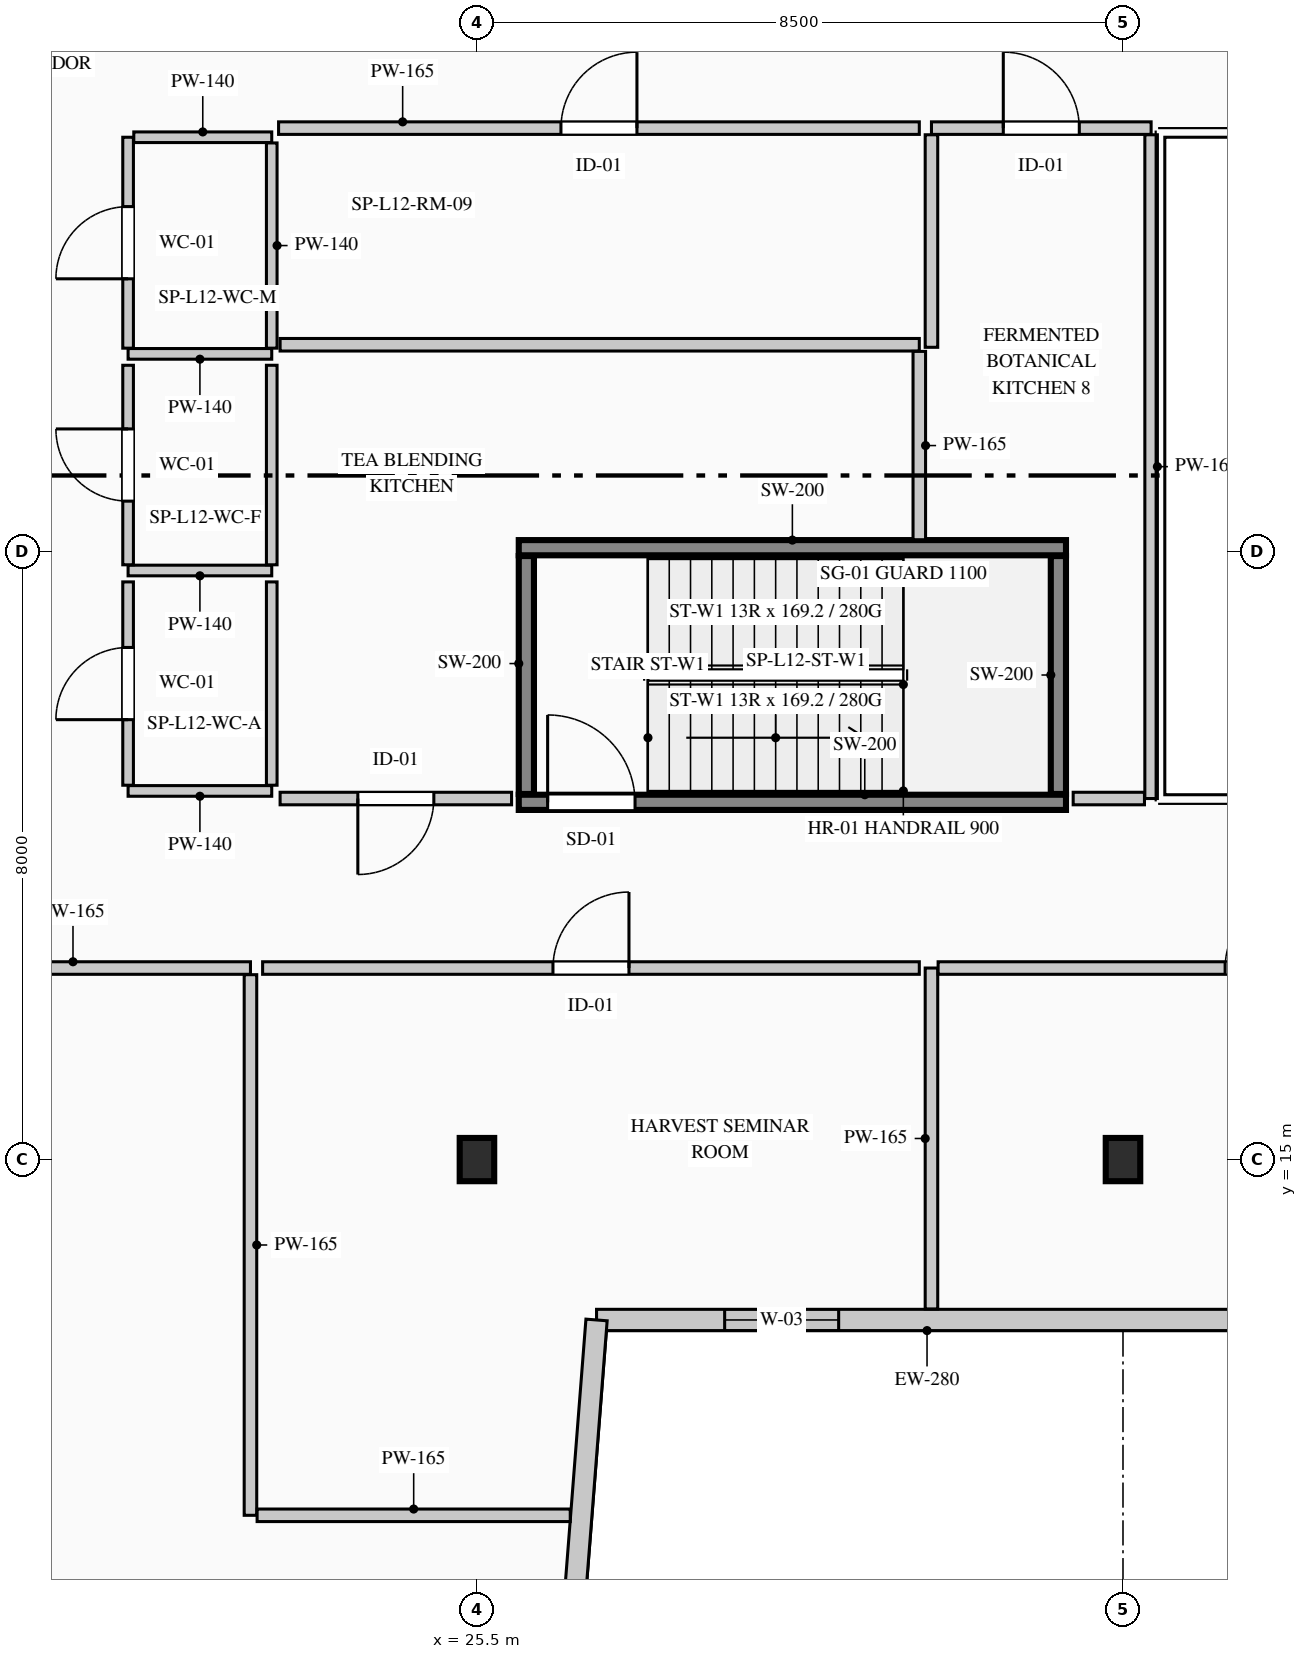
"""IFC4 building model, lengths in metres.
Left out: names, types, materials, properties, quantities, classifications, styles, units other than length and angle.
Written with IfcOpenShell. Run it as: python <this file> out.ifc"""

import sys

from ifc_helpers import new_model, si_unit, direction, frame, frame_2d, origin, origin_2d, place, context, subcontext, project, spatial, rectangle, i_section, extrude, element, fill, save


model = new_model("IFC4")
c1 = context("Model", 3, precision=1e-05, world=origin(), true_north=direction((0.0, 1.0)))
c2 = subcontext(c1, "Body", "Model", "MODEL_VIEW")
j1 = project(units=[si_unit("LENGTHUNIT", "METRE"), si_unit("PLANEANGLEUNIT", "RADIAN")], contexts=[c1])
p1 = place(None, origin())
s1 = spatial("IfcSite", under=j1, at=p1, CompositionType="ELEMENT")
p2 = place(p1, origin())
s2 = spatial("IfcBuilding", under=s1, at=p2, CompositionType="ELEMENT")
p3 = place(p2, frame((0.0, 0.0, 53.4)))
s3 = spatial("IfcBuildingStorey", under=s2, at=p3, CompositionType="ELEMENT", Elevation=53.4)
p4 = place(p3, frame((26.05, 19.7, 0.0), z_axis=(0.0, 0.0, 1.0), x_axis=(1.0, 0.0, 0.0)))
e1 = element("IfcWall", 1, at=p4, inside=s3, PredefinedType="SHEAR", context=c2, shape_type="SweptSolid", body=[
    extrude(rectangle(XDim=7.2, YDim=0.2, at=frame_2d((3.6, 0.0))), origin(), (0.0, 0.0, 1.0), 4.4),
])
p5 = place(p4, frame((0.38, 0.0, 0.0)))
e2 = element("IfcOpeningElement", 2, at=p5, cuts=e1, PredefinedType="OPENING", context=c2, shape_type="SweptSolid", body=[
    extrude(rectangle(XDim=1.15, YDim=2.2, at=frame_2d((0.575, 1.1))), frame((0.0, 0.11, 0.0), z_axis=(0.0, -1.0, 0.0), x_axis=(1.0, 0.0, 0.0)), (0.0, 0.0, 1.0), 0.22),
])
p6 = place(p3, frame((26.05, 23.05, 0.0), z_axis=(0.0, 0.0, 1.0), x_axis=(1.0, 0.0, 0.0)))
e3 = element("IfcWall", 3, at=p6, inside=s3, PredefinedType="SHEAR", context=c2, shape_type="SweptSolid", body=[
    extrude(rectangle(XDim=7.2, YDim=0.2, at=frame_2d((3.6, 0.0))), origin(), (0.0, 0.0, 1.0), 4.4),
])
for number, where, z_axis, x_axis in (
    (4, (26.15, 19.81, 0.0), (0.0, 0.0, 1.0), (0.0, 1.0, 0.0)),
    (5, (33.15, 19.81, 0.0), (0.0, 0.0, 1.0), (0.0, 1.0, 0.0)),
):
    element("IfcWall", number, at=place(p3, frame(where, z_axis=z_axis, x_axis=x_axis)), inside=s3, PredefinedType="SHEAR", context=c2, shape_type="SweptSolid", body=[
        extrude(rectangle(XDim=3.13, YDim=0.2, at=frame_2d((1.565, 0.0))), origin(), (0.0, 0.0, 1.0), 4.4),
    ])
for number, where, z_axis, x_axis in (
    (6, (25.5, 15.0, 0.0), (0.0, 0.0, 1.0), (1.0, 0.0, 0.0)),
    (7, (34.0, 15.0, 0.0), (0.0, 0.0, 1.0), (1.0, 0.0, 0.0)),
):
    element("IfcColumn", number, at=place(p3, frame(where, z_axis=z_axis, x_axis=x_axis)), inside=s3, PredefinedType="COLUMN", context=c2, shape_type="SweptSolid", body=[
        extrude(i_section(OverallWidth=0.454, OverallDepth=0.569, WebThickness=0.078, FlangeThickness=0.08, FilletRadius=0.015, at=origin_2d()), origin(), (0.0, 0.0, 1.0), 4.4),
    ])
p7 = place(p3, frame((35.77, 12.89, 0.0), z_axis=(0.0, 0.0, 1.0), x_axis=(-1.0, 0.0, 0.0)))
e8 = element("IfcWall", 8, at=p7, inside=s3, PredefinedType="STANDARD", context=c2, shape_type="SweptSolid", body=[
    extrude(rectangle(XDim=8.697, YDim=0.28, at=frame_2d((4.348, 0.0))), origin(), (0.0, 0.0, 1.0), 4.1),
])
p8 = place(p7, frame((5.511, 0.0, 0.9)))
e9 = element("IfcOpeningElement", 9, at=p8, cuts=e8, PredefinedType="OPENING", context=c2, shape_type="SweptSolid", body=[
    extrude(rectangle(XDim=1.5, YDim=1.8, at=frame_2d((0.75, 0.9))), frame((0.0, 0.15, 0.0), z_axis=(0.0, -1.0, 0.0), x_axis=(1.0, 0.0, 0.0)), (0.0, 0.0, 1.0), 0.3),
])
p9 = place(p3, frame((27.073, 12.89, 0.0), z_axis=(0.0, 0.0, 1.0), x_axis=(-0.077816860153, -0.996967670627, 0.0)))
e10 = element("IfcWall", 10, at=p9, inside=s3, PredefinedType="STANDARD", context=c2, shape_type="SweptSolid", body=[
    extrude(rectangle(XDim=10.281, YDim=0.28, at=frame_2d((5.141, 0.0))), origin(), (0.0, 0.0, 1.0), 4.1),
])
p10 = place(p3, frame((22.8, 25.6, 0.0), z_axis=(0.0, 0.0, 1.0), x_axis=(-1.0, 0.0, 0.0)))
e11 = element("IfcWall", 11, at=p10, inside=s3, PredefinedType="PARTITIONING", context=c2, shape_type="SweptSolid", body=[
    extrude(rectangle(XDim=1.89, YDim=0.14, at=frame_2d((0.945, 0.0))), origin(), (0.0, 0.0, 1.0), 4.1),
])
p11 = place(p3, frame((20.91, 25.675, 0.0), z_axis=(0.0, 0.0, 1.0), x_axis=(0.0, 1.0, 0.0)))
e12 = element("IfcWall", 12, at=p11, inside=s3, PredefinedType="PARTITIONING", context=c2, shape_type="SweptSolid", body=[
    extrude(rectangle(XDim=2.775, YDim=0.14, at=frame_2d((1.387, 0.0))), origin(), (0.0, 0.0, 1.0), 4.1),
])
p12 = place(p11, frame((0.913, 0.0, 0.0)))
e13 = element("IfcOpeningElement", 13, at=p12, cuts=e12, PredefinedType="OPENING", context=c2, shape_type="SweptSolid", body=[
    extrude(rectangle(XDim=0.95, YDim=2.15, at=frame_2d((0.475, 1.075))), frame((0.0, 0.08, 0.0), z_axis=(0.0, -1.0, 0.0), x_axis=(1.0, 0.0, 0.0)), (0.0, 0.0, 1.0), 0.16),
])
p13 = place(p3, frame((20.985, 28.45, 0.0), z_axis=(0.0, 0.0, 1.0), x_axis=(1.0, 0.0, 0.0)))
e14 = element("IfcWall", 14, at=p13, inside=s3, PredefinedType="PARTITIONING", context=c2, shape_type="SweptSolid", body=[
    extrude(rectangle(XDim=1.815, YDim=0.14, at=frame_2d((0.907, 0.0))), origin(), (0.0, 0.0, 1.0), 4.1),
])
p14 = place(p3, frame((22.8, 28.375, 0.0), z_axis=(0.0, 0.0, 1.0), x_axis=(0.0, -1.0, 0.0)))
e15 = element("IfcWall", 15, at=p14, inside=s3, PredefinedType="PARTITIONING", context=c2, shape_type="SweptSolid", body=[
    extrude(rectangle(XDim=2.7, YDim=0.14, at=frame_2d((1.35, 0.0))), origin(), (0.0, 0.0, 1.0), 3.685),
])
p15 = place(p3, frame((22.8, 22.75, 0.0), z_axis=(0.0, 0.0, 1.0), x_axis=(-1.0, 0.0, 0.0)))
e16 = element("IfcWall", 16, at=p15, inside=s3, PredefinedType="PARTITIONING", context=c2, shape_type="SweptSolid", body=[
    extrude(rectangle(XDim=1.89, YDim=0.14, at=frame_2d((0.945, 0.0))), origin(), (0.0, 0.0, 1.0), 4.1),
])
p16 = place(p3, frame((20.91, 22.825, 0.0), z_axis=(0.0, 0.0, 1.0), x_axis=(0.0, 1.0, 0.0)))
e17 = element("IfcWall", 17, at=p16, inside=s3, PredefinedType="PARTITIONING", context=c2, shape_type="SweptSolid", body=[
    extrude(rectangle(XDim=2.625, YDim=0.14, at=frame_2d((1.312, 0.0))), origin(), (0.0, 0.0, 1.0), 4.1),
])
p17 = place(p16, frame((0.837, 0.0, 0.0)))
e18 = element("IfcOpeningElement", 18, at=p17, cuts=e17, PredefinedType="OPENING", context=c2, shape_type="SweptSolid", body=[
    extrude(rectangle(XDim=0.95, YDim=2.15, at=frame_2d((0.475, 1.075))), frame((0.0, 0.08, 0.0), z_axis=(0.0, -1.0, 0.0), x_axis=(1.0, 0.0, 0.0)), (0.0, 0.0, 1.0), 0.16),
])
p18 = place(p3, frame((22.8, 25.45, 0.0), z_axis=(0.0, 0.0, 1.0), x_axis=(0.0, -1.0, 0.0)))
e19 = element("IfcWall", 19, at=p18, inside=s3, PredefinedType="PARTITIONING", context=c2, shape_type="SweptSolid", body=[
    extrude(rectangle(XDim=2.625, YDim=0.14, at=frame_2d((1.312, 0.0))), origin(), (0.0, 0.0, 1.0), 3.685),
])
p19 = place(p3, frame((22.8, 19.85, 0.0), z_axis=(0.0, 0.0, 1.0), x_axis=(-1.0, 0.0, 0.0)))
e20 = element("IfcWall", 20, at=p19, inside=s3, PredefinedType="PARTITIONING", context=c2, shape_type="SweptSolid", body=[
    extrude(rectangle(XDim=1.89, YDim=0.14, at=frame_2d((0.945, 0.0))), origin(), (0.0, 0.0, 1.0), 4.1),
])
p20 = place(p3, frame((20.91, 19.925, 0.0), z_axis=(0.0, 0.0, 1.0), x_axis=(0.0, 1.0, 0.0)))
e21 = element("IfcWall", 21, at=p20, inside=s3, PredefinedType="PARTITIONING", context=c2, shape_type="SweptSolid", body=[
    extrude(rectangle(XDim=2.675, YDim=0.14, at=frame_2d((1.337, 0.0))), origin(), (0.0, 0.0, 1.0), 4.1),
])
p21 = place(p20, frame((0.863, 0.0, 0.0)))
e22 = element("IfcOpeningElement", 22, at=p21, cuts=e21, PredefinedType="OPENING", context=c2, shape_type="SweptSolid", body=[
    extrude(rectangle(XDim=0.95, YDim=2.15, at=frame_2d((0.475, 1.075))), frame((0.0, 0.08, 0.0), z_axis=(0.0, -1.0, 0.0), x_axis=(1.0, 0.0, 0.0)), (0.0, 0.0, 1.0), 0.16),
])
p22 = place(p3, frame((22.8, 22.6, 0.0), z_axis=(0.0, 0.0, 1.0), x_axis=(0.0, -1.0, 0.0)))
e23 = element("IfcWall", 23, at=p22, inside=s3, PredefinedType="PARTITIONING", context=c2, shape_type="SweptSolid", body=[
    extrude(rectangle(XDim=2.675, YDim=0.14, at=frame_2d((1.337, 0.0))), origin(), (0.0, 0.0, 1.0), 3.685),
])
p23 = place(p3, frame((11.28, 17.52, 0.0), z_axis=(0.0, 0.0, 1.0), x_axis=(1.0, 0.0, 0.0)))
e24 = element("IfcWall", 24, at=p23, inside=s3, PredefinedType="PARTITIONING", context=c2, shape_type="SweptSolid", body=[
    extrude(rectangle(XDim=11.24, YDim=0.165, at=frame_2d((5.62, 0.0))), origin(), (0.0, 0.0, 1.0), 4.1),
])
p24 = place(p23, frame((5.12, 0.0, 0.0)))
e25 = element("IfcOpeningElement", 25, at=p24, cuts=e24, PredefinedType="OPENING", context=c2, shape_type="SweptSolid", body=[
    extrude(rectangle(XDim=1.0, YDim=2.15, at=frame_2d((0.5, 1.075))), frame((0.0, 0.093, 0.0), z_axis=(0.0, -1.0, 0.0), x_axis=(1.0, 0.0, 0.0)), (0.0, 0.0, 1.0), 0.185),
])
p25 = place(p3, frame((22.52, 17.433, 0.0), z_axis=(0.0, 0.0, 1.0), x_axis=(0.0, -1.0, 0.0)))
e26 = element("IfcWall", 26, at=p25, inside=s3, PredefinedType="PARTITIONING", context=c2, shape_type="SweptSolid", body=[
    extrude(rectangle(XDim=7.113, YDim=0.165, at=frame_2d((3.556, 0.0))), origin(), (0.0, 0.0, 1.0), 3.685),
])
p26 = place(p3, frame((22.607, 10.32, 0.0), z_axis=(0.0, 0.0, 1.0), x_axis=(1.0, 0.0, 0.0)))
e27 = element("IfcWall", 27, at=p26, inside=s3, PredefinedType="PARTITIONING", context=c2, shape_type="SweptSolid", body=[
    extrude(rectangle(XDim=4.12, YDim=0.165, at=frame_2d((2.06, 0.0))), origin(), (0.0, 0.0, 1.0), 4.1),
])
p27 = place(p3, frame((31.48, 13.035, 0.0), z_axis=(0.0, 0.0, 1.0), x_axis=(0.0, 1.0, 0.0)))
e28 = element("IfcWall", 28, at=p27, inside=s3, PredefinedType="PARTITIONING", context=c2, shape_type="SweptSolid", body=[
    extrude(rectangle(XDim=4.485, YDim=0.165, at=frame_2d((2.243, 0.0))), origin(), (0.0, 0.0, 1.0), 4.1),
])
p28 = place(p3, frame((31.567, 17.52, 0.0), z_axis=(0.0, 0.0, 1.0), x_axis=(1.0, 0.0, 0.0)))
e29 = element("IfcWall", 29, at=p28, inside=s3, PredefinedType="PARTITIONING", context=c2, shape_type="SweptSolid", body=[
    extrude(rectangle(XDim=8.553, YDim=0.165, at=frame_2d((4.276, 0.0))), origin(), (0.0, 0.0, 1.0), 3.685),
])
p29 = place(p28, frame((3.776, 0.0, 0.0)))
e30 = element("IfcOpeningElement", 30, at=p29, cuts=e29, PredefinedType="OPENING", context=c2, shape_type="SweptSolid", body=[
    extrude(rectangle(XDim=1.0, YDim=2.15, at=frame_2d((0.5, 1.075))), frame((0.0, 0.093, 0.0), z_axis=(0.0, -1.0, 0.0), x_axis=(1.0, 0.0, 0.0)), (0.0, 0.0, 1.0), 0.185),
])
p30 = place(p3, frame((22.68, 17.52, 0.0), z_axis=(0.0, 0.0, 1.0), x_axis=(1.0, 0.0, 0.0)))
e31 = element("IfcWall", 31, at=p30, inside=s3, PredefinedType="PARTITIONING", context=c2, shape_type="SweptSolid", body=[
    extrude(rectangle(XDim=8.64, YDim=0.165, at=frame_2d((4.32, 0.0))), origin(), (0.0, 0.0, 1.0), 3.685),
])
p31 = place(p30, frame((3.82, 0.0, 0.0)))
e32 = element("IfcOpeningElement", 32, at=p31, cuts=e31, PredefinedType="OPENING", context=c2, shape_type="SweptSolid", body=[
    extrude(rectangle(XDim=1.0, YDim=2.15, at=frame_2d((0.5, 1.075))), frame((0.0, 0.093, 0.0), z_axis=(0.0, -1.0, 0.0), x_axis=(1.0, 0.0, 0.0)), (0.0, 0.0, 1.0), 0.185),
])
p32 = place(p3, frame((25.956, 19.75, 0.0), z_axis=(0.0, 0.0, 1.0), x_axis=(-1.0, 0.0, 0.0)))
e33 = element("IfcWall", 33, at=p32, inside=s3, PredefinedType="PARTITIONING", context=c2, shape_type="SweptSolid", body=[
    extrude(rectangle(XDim=3.046, YDim=0.165, at=frame_2d((1.523, 0.0))), origin(), (0.0, 0.0, 1.0), 4.1),
])
p33 = place(p32, frame((1.023, 0.0, 0.0)))
e34 = element("IfcOpeningElement", 34, at=p33, cuts=e33, PredefinedType="OPENING", context=c2, shape_type="SweptSolid", body=[
    extrude(rectangle(XDim=1.0, YDim=2.15, at=frame_2d((0.5, 1.075))), frame((0.0, 0.093, 0.0), z_axis=(0.0, -1.0, 0.0), x_axis=(1.0, 0.0, 0.0)), (0.0, 0.0, 1.0), 0.185),
])
p34 = place(p3, frame((22.91, 25.72, 0.0), z_axis=(0.0, 0.0, 1.0), x_axis=(1.0, 0.0, 0.0)))
e35 = element("IfcWall", 35, at=p34, inside=s3, PredefinedType="PARTITIONING", context=c2, shape_type="SweptSolid", body=[
    extrude(rectangle(XDim=8.41, YDim=0.165, at=frame_2d((4.205, 0.0))), origin(), (0.0, 0.0, 1.0), 3.685),
])
p35 = place(p3, frame((31.32, 25.633, 0.0), z_axis=(0.0, 0.0, 1.0), x_axis=(0.0, -1.0, 0.0)))
e36 = element("IfcWall", 36, at=p35, inside=s3, PredefinedType="PARTITIONING", context=c2, shape_type="SweptSolid", body=[
    extrude(rectangle(XDim=2.478, YDim=0.165, at=frame_2d((1.239, 0.0))), origin(), (0.0, 0.0, 1.0), 4.1),
])
p36 = place(p3, frame((31.48, 28.57, 0.0), z_axis=(0.0, 0.0, 1.0), x_axis=(1.0, 0.0, 0.0)))
e37 = element("IfcWall", 37, at=p36, inside=s3, PredefinedType="PARTITIONING", context=c2, shape_type="SweptSolid", body=[
    extrude(rectangle(XDim=2.89, YDim=0.165, at=frame_2d((1.445, 0.0))), origin(), (0.0, 0.0, 1.0), 3.685),
])
p37 = place(p36, frame((0.945, 0.0, 0.0)))
e38 = element("IfcOpeningElement", 38, at=p37, cuts=e37, PredefinedType="OPENING", context=c2, shape_type="SweptSolid", body=[
    extrude(rectangle(XDim=1.0, YDim=2.15, at=frame_2d((0.5, 1.075))), frame((0.0, 0.093, 0.0), z_axis=(0.0, -1.0, 0.0), x_axis=(1.0, 0.0, 0.0)), (0.0, 0.0, 1.0), 0.185),
])
p38 = place(p3, frame((34.37, 28.482, 0.0), z_axis=(0.0, 0.0, 1.0), x_axis=(0.0, -1.0, 0.0)))
e39 = element("IfcWall", 39, at=p38, inside=s3, PredefinedType="PARTITIONING", context=c2, shape_type="SweptSolid", body=[
    extrude(rectangle(XDim=8.732, YDim=0.165, at=frame_2d((4.366, 0.0))), origin(), (0.0, 0.0, 1.0), 4.1),
])
p39 = place(p3, frame((34.282, 19.75, 0.0), z_axis=(0.0, 0.0, 1.0), x_axis=(-1.0, 0.0, 0.0)))
e40 = element("IfcWall", 40, at=p39, inside=s3, PredefinedType="PARTITIONING", context=c2, shape_type="SweptSolid", body=[
    extrude(rectangle(XDim=0.938, YDim=0.165, at=frame_2d((0.469, 0.0))), origin(), (0.0, 0.0, 1.0), 4.1),
])
p40 = place(p3, frame((31.48, 25.686, 0.0), z_axis=(0.0, 0.0, 1.0), x_axis=(0.0, 1.0, 0.0)))
e41 = element("IfcWall", 41, at=p40, inside=s3, PredefinedType="PARTITIONING", context=c2, shape_type="SweptSolid", body=[
    extrude(rectangle(XDim=2.796, YDim=0.165, at=frame_2d((1.398, 0.0))), origin(), (0.0, 0.0, 1.0), 4.1),
])
p41 = place(p3, frame((22.89, 28.57, 0.0), z_axis=(0.0, 0.0, 1.0), x_axis=(1.0, 0.0, 0.0)))
e42 = element("IfcWall", 42, at=p41, inside=s3, PredefinedType="PARTITIONING", context=c2, shape_type="SweptSolid", body=[
    extrude(rectangle(XDim=8.43, YDim=0.165, at=frame_2d((4.215, 0.0))), origin(), (0.0, 0.0, 1.0), 3.685),
])
p42 = place(p41, frame((3.715, 0.0, 0.0)))
e43 = element("IfcOpeningElement", 43, at=p42, cuts=e42, PredefinedType="OPENING", context=c2, shape_type="SweptSolid", body=[
    extrude(rectangle(XDim=1.0, YDim=2.15, at=frame_2d((0.5, 1.075))), frame((0.0, 0.093, 0.0), z_axis=(0.0, -1.0, 0.0), x_axis=(1.0, 0.0, 0.0)), (0.0, 0.0, 1.0), 0.185),
])
p43 = place(p8, origin())
e44 = element("IfcWindow", 44, at=p43, inside=s3, PartitioningType="SINGLE_PANEL", PredefinedType="WINDOW", context=c2, shape_type="SweptSolid", body=[
    extrude(rectangle(XDim=1.5, YDim=1.8, at=frame_2d((0.75, 0.9))), frame((0.0, 0.03, 0.0), z_axis=(0.0, -1.0, 0.0), x_axis=(1.0, 0.0, 0.0)), (0.0, 0.0, 1.0), 0.06),
])
fill(e9, e44)
p44 = place(p5, origin())
e45 = element("IfcDoor", 45, at=p44, inside=s3, OperationType="SINGLE_SWING_LEFT", PredefinedType="DOOR", context=c2, shape_type="SweptSolid", body=[
    extrude(rectangle(XDim=1.15, YDim=2.2, at=frame_2d((0.575, 1.1))), frame((0.0, 0.025, 0.0), z_axis=(0.0, -1.0, 0.0), x_axis=(1.0, 0.0, 0.0)), (0.0, 0.0, 1.0), 0.05),
])
fill(e2, e45)
p45 = place(p12, origin())
e46 = element("IfcDoor", 46, at=p45, inside=s3, OperationType="SINGLE_SWING_LEFT", PredefinedType="DOOR", context=c2, shape_type="SweptSolid", body=[
    extrude(rectangle(XDim=0.95, YDim=2.15, at=frame_2d((0.475, 1.075))), frame((0.0, 0.025, 0.0), z_axis=(0.0, -1.0, 0.0), x_axis=(1.0, 0.0, 0.0)), (0.0, 0.0, 1.0), 0.05),
])
fill(e13, e46)
p46 = place(p17, origin())
e47 = element("IfcDoor", 47, at=p46, inside=s3, OperationType="SINGLE_SWING_RIGHT", PredefinedType="DOOR", context=c2, shape_type="SweptSolid", body=[
    extrude(rectangle(XDim=0.95, YDim=2.15, at=frame_2d((0.475, 1.075))), frame((0.0, 0.025, 0.0), z_axis=(0.0, -1.0, 0.0), x_axis=(1.0, 0.0, 0.0)), (0.0, 0.0, 1.0), 0.05),
])
fill(e18, e47)
p47 = place(p21, origin())
e48 = element("IfcDoor", 48, at=p47, inside=s3, OperationType="SINGLE_SWING_LEFT", PredefinedType="DOOR", context=c2, shape_type="SweptSolid", body=[
    extrude(rectangle(XDim=0.95, YDim=2.15, at=frame_2d((0.475, 1.075))), frame((0.0, 0.025, 0.0), z_axis=(0.0, -1.0, 0.0), x_axis=(1.0, 0.0, 0.0)), (0.0, 0.0, 1.0), 0.05),
])
fill(e22, e48)
p48 = place(p29, origin())
e49 = element("IfcDoor", 49, at=p48, inside=s3, OperationType="SINGLE_SWING_RIGHT", PredefinedType="DOOR", context=c2, shape_type="SweptSolid", body=[
    extrude(rectangle(XDim=1.0, YDim=2.15, at=frame_2d((0.5, 1.075))), frame((0.0, 0.025, 0.0), z_axis=(0.0, -1.0, 0.0), x_axis=(1.0, 0.0, 0.0)), (0.0, 0.0, 1.0), 0.05),
])
fill(e30, e49)
p49 = place(p31, origin())
e50 = element("IfcDoor", 50, at=p49, inside=s3, OperationType="SINGLE_SWING_RIGHT", PredefinedType="DOOR", context=c2, shape_type="SweptSolid", body=[
    extrude(rectangle(XDim=1.0, YDim=2.15, at=frame_2d((0.5, 1.075))), frame((0.0, 0.025, 0.0), z_axis=(0.0, -1.0, 0.0), x_axis=(1.0, 0.0, 0.0)), (0.0, 0.0, 1.0), 0.05),
])
fill(e32, e50)
p50 = place(p33, origin())
e51 = element("IfcDoor", 51, at=p50, inside=s3, OperationType="SINGLE_SWING_RIGHT", PredefinedType="DOOR", context=c2, shape_type="SweptSolid", body=[
    extrude(rectangle(XDim=1.0, YDim=2.15, at=frame_2d((0.5, 1.075))), frame((0.0, 0.025, 0.0), z_axis=(0.0, -1.0, 0.0), x_axis=(1.0, 0.0, 0.0)), (0.0, 0.0, 1.0), 0.05),
])
fill(e34, e51)
p51 = place(p37, origin())
e52 = element("IfcDoor", 52, at=p51, inside=s3, OperationType="SINGLE_SWING_LEFT", PredefinedType="DOOR", context=c2, shape_type="SweptSolid", body=[
    extrude(rectangle(XDim=1.0, YDim=2.15, at=frame_2d((0.5, 1.075))), frame((0.0, 0.025, 0.0), z_axis=(0.0, -1.0, 0.0), x_axis=(1.0, 0.0, 0.0)), (0.0, 0.0, 1.0), 0.05),
])
fill(e38, e52)
p52 = place(p42, origin())
e53 = element("IfcDoor", 53, at=p52, inside=s3, OperationType="SINGLE_SWING_RIGHT", PredefinedType="DOOR", context=c2, shape_type="SweptSolid", body=[
    extrude(rectangle(XDim=1.0, YDim=2.15, at=frame_2d((0.5, 1.075))), frame((0.0, 0.025, 0.0), z_axis=(0.0, -1.0, 0.0), x_axis=(1.0, 0.0, 0.0)), (0.0, 0.0, 1.0), 0.05),
])
fill(e43, e53)
save(model, sys.argv[1])
